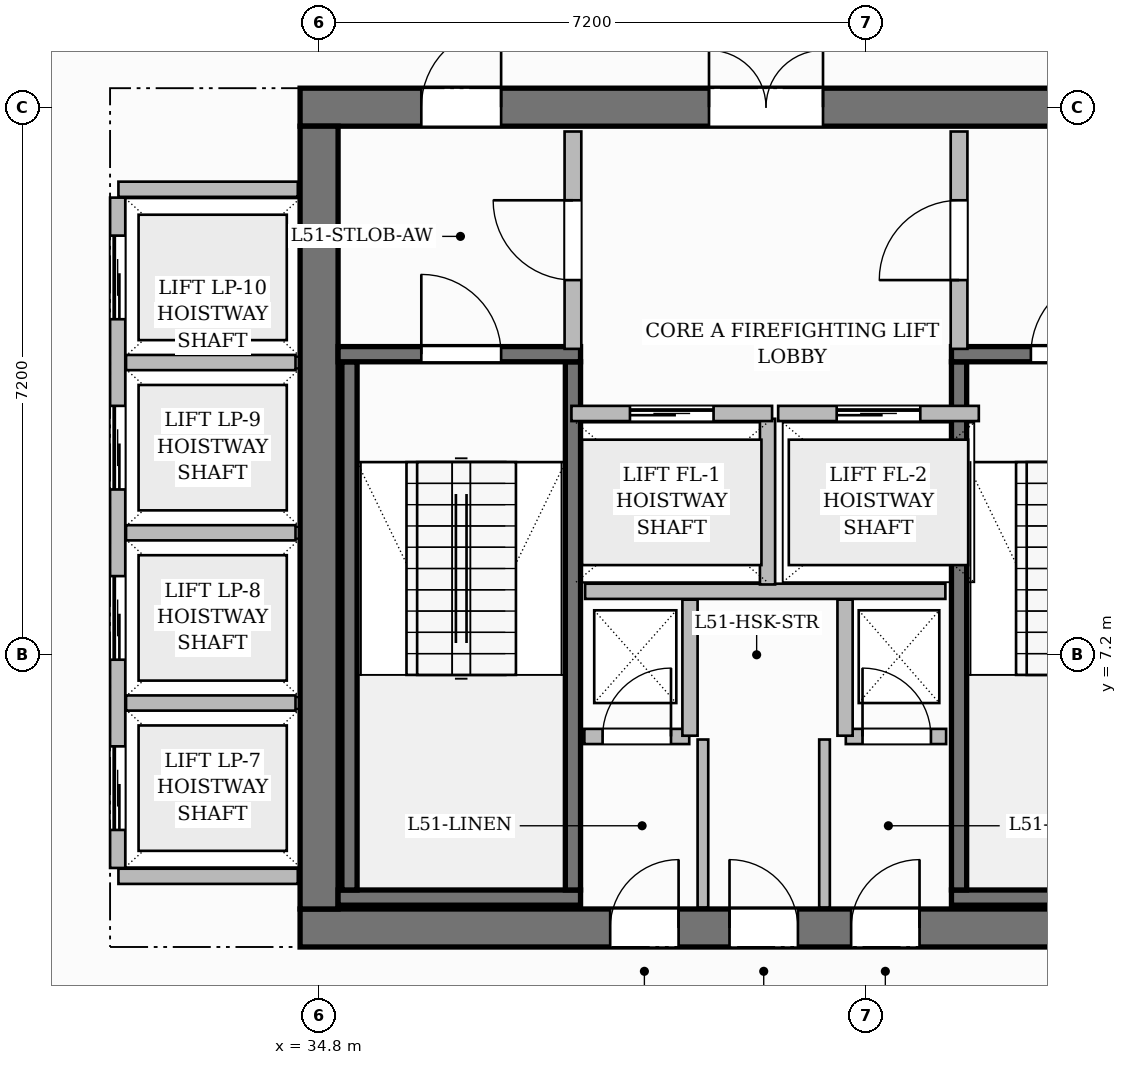
"""IFC4 building model, lengths in metres.
Left out: names, types, materials, properties, quantities, classifications, styles, units other than length and angle.
Written with IfcOpenShell. Run it as: python <this file> out.ifc"""

import sys

from ifc_helpers import new_model, si_unit, direction, frame, frame_2d, origin, place, context, subcontext, project, spatial, rectangle, extrude, source, transform, mapped, element, fill, save


model = new_model("IFC4")
c1 = context("Model", 3, precision=1e-05, world=origin(), true_north=direction((0.0, 1.0)))
c2 = subcontext(c1, "Body", "Model", "MODEL_VIEW")
j1 = project(units=[si_unit("LENGTHUNIT", "METRE"), si_unit("PLANEANGLEUNIT", "RADIAN")], contexts=[c1])
p1 = place(None, origin())
s1 = spatial("IfcSite", under=j1, at=p1, CompositionType="ELEMENT")
p2 = place(p1, origin())
s2 = spatial("IfcBuilding", under=s1, at=p2, CompositionType="ELEMENT")
p3 = place(p2, frame((0.0, 0.0, 205.75)))
s3 = spatial("IfcBuildingStorey", under=s2, at=p3, CompositionType="ELEMENT", Elevation=205.75)
p4 = place(p3, frame((34.55, 3.6, 0.0), z_axis=(0.0, 0.0, 1.0), x_axis=(1.0, 0.0, 0.0)))
e1 = element("IfcWall", 1, at=p4, inside=s3, PredefinedType="SHEAR", context=c2, shape_type="SweptSolid", body=[
    extrude(rectangle(XDim=15.5, YDim=0.5, at=frame_2d((7.75, 0.0))), origin(), (0.0, 0.0, 1.0), 3.85),
])
p5 = place(p4, frame((4.08, 0.0, 0.0)))
e2 = element("IfcOpeningElement", 2, at=p5, cuts=e1, PredefinedType="OPENING", context=c2, shape_type="SweptSolid", body=[
    extrude(rectangle(XDim=0.9, YDim=2.1, at=frame_2d((0.45, 1.05))), frame((0.0, 0.26, 0.0), z_axis=(0.0, -1.0, 0.0), x_axis=(1.0, 0.0, 0.0)), (0.0, 0.0, 1.0), 0.52),
])
p6 = place(p4, frame((5.65, 0.0, 0.0)))
e3 = element("IfcOpeningElement", 3, at=p6, cuts=e1, PredefinedType="OPENING", context=c2, shape_type="SweptSolid", body=[
    extrude(rectangle(XDim=0.9, YDim=2.1, at=frame_2d((0.45, 1.05))), frame((0.0, 0.26, 0.0), z_axis=(0.0, -1.0, 0.0), x_axis=(1.0, 0.0, 0.0)), (0.0, 0.0, 1.0), 0.52),
])
p7 = place(p4, frame((7.25, 0.0, 0.0)))
e4 = element("IfcOpeningElement", 4, at=p7, cuts=e1, PredefinedType="OPENING", context=c2, shape_type="SweptSolid", body=[
    extrude(rectangle(XDim=0.9, YDim=2.1, at=frame_2d((0.45, 1.05))), frame((0.0, 0.26, 0.0), z_axis=(0.0, -1.0, 0.0), x_axis=(1.0, 0.0, 0.0)), (0.0, 0.0, 1.0), 0.52),
])
p8 = place(p3, frame((34.55, 14.4, 0.0), z_axis=(0.0, 0.0, 1.0), x_axis=(1.0, 0.0, 0.0)))
e5 = element("IfcWall", 5, at=p8, inside=s3, PredefinedType="SHEAR", context=c2, shape_type="SweptSolid", body=[
    extrude(rectangle(XDim=15.5, YDim=0.5, at=frame_2d((7.75, 0.0))), origin(), (0.0, 0.0, 1.0), 3.85),
])
p9 = place(p8, frame((5.38, 0.0, 0.0)))
e6 = element("IfcOpeningElement", 6, at=p9, cuts=e5, PredefinedType="OPENING", context=c2, shape_type="SweptSolid", body=[
    extrude(rectangle(XDim=1.5, YDim=2.2, at=frame_2d((0.75, 1.1))), frame((0.0, 0.26, 0.0), z_axis=(0.0, -1.0, 0.0), x_axis=(1.0, 0.0, 0.0)), (0.0, 0.0, 1.0), 0.52),
])
p10 = place(p8, frame((1.595, 0.0, 0.0)))
e7 = element("IfcOpeningElement", 7, at=p10, cuts=e5, PredefinedType="OPENING", context=c2, shape_type="SweptSolid", body=[
    extrude(rectangle(XDim=1.05, YDim=2.15, at=frame_2d((0.525, 1.075))), frame((0.0, 0.26, 0.0), z_axis=(0.0, -1.0, 0.0), x_axis=(1.0, 0.0, 0.0)), (0.0, 0.0, 1.0), 0.52),
])
p11 = place(p8, frame((11.225, 0.0, 0.0)))
e8 = element("IfcOpeningElement", 8, at=p11, cuts=e5, PredefinedType="OPENING", context=c2, shape_type="SweptSolid", body=[
    extrude(rectangle(XDim=1.05, YDim=2.15, at=frame_2d((0.525, 1.075))), frame((0.0, 0.26, 0.0), z_axis=(0.0, -1.0, 0.0), x_axis=(1.0, 0.0, 0.0)), (0.0, 0.0, 1.0), 0.52),
])
p12 = place(p3, frame((34.8, 3.85, 0.0), z_axis=(0.0, 0.0, 1.0), x_axis=(0.0, 1.0, 0.0)))
e9 = element("IfcWall", 9, at=p12, inside=s3, PredefinedType="SHEAR", context=c2, shape_type="SweptSolid", body=[
    extrude(rectangle(XDim=10.3, YDim=0.5, at=frame_2d((5.15, 0.0))), origin(), (0.0, 0.0, 1.0), 3.85),
])
p13 = place(p3, frame((35.05, 4.0, 0.0), z_axis=(0.0, 0.0, 1.0), x_axis=(1.0, 0.0, 0.0)))
e10 = element("IfcWall", 10, at=p13, inside=s3, PredefinedType="SHEAR", context=c2, shape_type="SweptSolid", body=[
    extrude(rectangle(XDim=3.19, YDim=0.2, at=frame_2d((1.595, 0.0))), origin(), (0.0, 0.0, 1.0), 3.85),
])
for number, where, z_axis, x_axis in (
    (11, (35.2, 4.1, 0.0), (0.0, 0.0, 1.0), (0.0, 1.0, 0.0)),
    (12, (38.14, 4.1, 0.0), (0.0, 0.0, 1.0), (0.0, 1.0, 0.0)),
):
    element("IfcWall", number, at=place(p3, frame(where, z_axis=z_axis, x_axis=x_axis)), inside=s3, PredefinedType="SHEAR", context=c2, shape_type="SweptSolid", body=[
        extrude(rectangle(XDim=6.95, YDim=0.2, at=frame_2d((3.475, 0.0))), origin(), (0.0, 0.0, 1.0), 3.85),
    ])
p14 = place(p3, frame((35.05, 11.15, 0.0), z_axis=(0.0, 0.0, 1.0), x_axis=(1.0, 0.0, 0.0)))
e13 = element("IfcWall", 13, at=p14, inside=s3, PredefinedType="SHEAR", context=c2, shape_type="SweptSolid", body=[
    extrude(rectangle(XDim=3.19, YDim=0.2, at=frame_2d((1.595, 0.0))), origin(), (0.0, 0.0, 1.0), 3.85),
])
p15 = place(p14, frame((1.095, 0.0, 0.0)))
e14 = element("IfcOpeningElement", 14, at=p15, cuts=e13, PredefinedType="OPENING", context=c2, shape_type="SweptSolid", body=[
    extrude(rectangle(XDim=1.05, YDim=2.2, at=frame_2d((0.525, 1.1))), frame((0.0, 0.11, 0.0), z_axis=(0.0, -1.0, 0.0), x_axis=(1.0, 0.0, 0.0)), (0.0, 0.0, 1.0), 0.22),
])
p16 = place(p3, frame((43.12, 4.0, 0.0), z_axis=(0.0, 0.0, 1.0), x_axis=(1.0, 0.0, 0.0)))
e15 = element("IfcWall", 15, at=p16, inside=s3, PredefinedType="SHEAR", context=c2, shape_type="SweptSolid", body=[
    extrude(rectangle(XDim=6.43, YDim=0.2, at=frame_2d((3.215, 0.0))), origin(), (0.0, 0.0, 1.0), 3.85),
])
p17 = place(p3, frame((43.22, 4.1, 0.0), z_axis=(0.0, 0.0, 1.0), x_axis=(0.0, 1.0, 0.0)))
e16 = element("IfcWall", 16, at=p17, inside=s3, PredefinedType="SHEAR", context=c2, shape_type="SweptSolid", body=[
    extrude(rectangle(XDim=6.95, YDim=0.2, at=frame_2d((3.475, 0.0))), origin(), (0.0, 0.0, 1.0), 3.85),
])
p18 = place(p3, frame((43.12, 11.15, 0.0), z_axis=(0.0, 0.0, 1.0), x_axis=(1.0, 0.0, 0.0)))
e17 = element("IfcWall", 17, at=p18, inside=s3, PredefinedType="SHEAR", context=c2, shape_type="SweptSolid", body=[
    extrude(rectangle(XDim=6.43, YDim=0.2, at=frame_2d((3.215, 0.0))), origin(), (0.0, 0.0, 1.0), 3.85),
])
p19 = place(p18, frame((1.045, 0.0, 0.0)))
e18 = element("IfcOpeningElement", 18, at=p19, cuts=e17, PredefinedType="OPENING", context=c2, shape_type="SweptSolid", body=[
    extrude(rectangle(XDim=1.05, YDim=2.2, at=frame_2d((0.525, 1.1))), frame((0.0, 0.11, 0.0), z_axis=(0.0, -1.0, 0.0), x_axis=(1.0, 0.0, 0.0)), (0.0, 0.0, 1.0), 0.22),
])
p20 = place(p18, frame((4.125, 0.0, 0.0)))
e19 = element("IfcOpeningElement", 19, at=p20, cuts=e17, PredefinedType="OPENING", context=c2, shape_type="SweptSolid", body=[
    extrude(rectangle(XDim=1.05, YDim=2.2, at=frame_2d((0.525, 1.1))), frame((0.0, 0.11, 0.0), z_axis=(0.0, -1.0, 0.0), x_axis=(1.0, 0.0, 0.0)), (0.0, 0.0, 1.0), 0.22),
])
p21 = place(p3, frame((38.3, 8.03, 0.0), z_axis=(0.0, 0.0, 1.0), x_axis=(1.0, 0.0, 0.0)))
e20 = element("IfcWall", 20, at=p21, inside=s3, PredefinedType="PARTITIONING", context=c2, shape_type="SweptSolid", body=[
    extrude(rectangle(XDim=4.74, YDim=0.2, at=frame_2d((2.37, 0.0))), origin(), (0.0, 0.0, 1.0), 3.6),
])
p22 = place(p3, frame((40.7, 8.12, 0.0), z_axis=(0.0, 0.0, 1.0), x_axis=(0.0, 1.0, 0.0)))
e21 = element("IfcWall", 21, at=p22, inside=s3, PredefinedType="PARTITIONING", context=c2, shape_type="SweptSolid", body=[
    extrude(rectangle(XDim=2.18, YDim=0.2, at=frame_2d((1.09, 0.0))), origin(), (0.0, 0.0, 1.0), 3.6),
])
p23 = place(p3, frame((38.14, 11.22, 0.0), z_axis=(0.0, 0.0, 1.0), x_axis=(0.0, 1.0, 0.0)))
e22 = element("IfcWall", 22, at=p23, inside=s3, PredefinedType="PARTITIONING", context=c2, shape_type="SweptSolid", body=[
    extrude(rectangle(XDim=2.86, YDim=0.22, at=frame_2d((1.43, 0.0))), origin(), (0.0, 0.0, 1.0), 3.6),
])
p24 = place(p23, frame((0.905, 0.0, 0.0)))
e23 = element("IfcOpeningElement", 23, at=p24, cuts=e22, PredefinedType="OPENING", context=c2, shape_type="SweptSolid", body=[
    extrude(rectangle(XDim=1.05, YDim=2.15, at=frame_2d((0.525, 1.075))), frame((0.0, 0.12, 0.0), z_axis=(0.0, -1.0, 0.0), x_axis=(1.0, 0.0, 0.0)), (0.0, 0.0, 1.0), 0.24),
])
p25 = place(p3, frame((43.22, 11.22, 0.0), z_axis=(0.0, 0.0, 1.0), x_axis=(0.0, 1.0, 0.0)))
e24 = element("IfcWall", 24, at=p25, inside=s3, PredefinedType="PARTITIONING", context=c2, shape_type="SweptSolid", body=[
    extrude(rectangle(XDim=2.86, YDim=0.22, at=frame_2d((1.43, 0.0))), origin(), (0.0, 0.0, 1.0), 3.6),
])
p26 = place(p25, frame((0.905, 0.0, 0.0)))
e25 = element("IfcOpeningElement", 25, at=p26, cuts=e24, PredefinedType="OPENING", context=c2, shape_type="SweptSolid", body=[
    extrude(rectangle(XDim=1.05, YDim=2.15, at=frame_2d((0.525, 1.075))), frame((0.0, 0.12, 0.0), z_axis=(0.0, -1.0, 0.0), x_axis=(1.0, 0.0, 0.0)), (0.0, 0.0, 1.0), 0.24),
])
p27 = place(p3, frame((38.29, 6.12, 0.0), z_axis=(0.0, 0.0, 1.0), x_axis=(1.0, 0.0, 0.0)))
e26 = element("IfcWall", 26, at=p27, inside=s3, PredefinedType="PARTITIONING", context=c2, shape_type="SweptSolid", body=[
    extrude(rectangle(XDim=1.38, YDim=0.2, at=frame_2d((0.69, 0.0))), origin(), (0.0, 0.0, 1.0), 3.6),
])
p28 = place(p27, frame((0.24, 0.0, 0.0)))
e27 = element("IfcOpeningElement", 27, at=p28, cuts=e26, PredefinedType="OPENING", context=c2, shape_type="SweptSolid", body=[
    extrude(rectangle(XDim=0.9, YDim=2.1, at=frame_2d((0.45, 1.05))), frame((0.0, 0.11, 0.0), z_axis=(0.0, -1.0, 0.0), x_axis=(1.0, 0.0, 0.0)), (0.0, 0.0, 1.0), 0.22),
])
p29 = place(p3, frame((39.68, 6.13, 0.0), z_axis=(0.0, 0.0, 1.0), x_axis=(0.0, 1.0, 0.0)))
e28 = element("IfcWall", 28, at=p29, inside=s3, PredefinedType="PARTITIONING", context=c2, shape_type="SweptSolid", body=[
    extrude(rectangle(XDim=1.79, YDim=0.2, at=frame_2d((0.895, 0.0))), origin(), (0.0, 0.0, 1.0), 3.6),
])
p30 = place(p3, frame((41.73, 6.12, 0.0), z_axis=(0.0, 0.0, 1.0), x_axis=(1.0, 0.0, 0.0)))
e29 = element("IfcWall", 29, at=p30, inside=s3, PredefinedType="PARTITIONING", context=c2, shape_type="SweptSolid", body=[
    extrude(rectangle(XDim=1.32, YDim=0.2, at=frame_2d((0.66, 0.0))), origin(), (0.0, 0.0, 1.0), 3.6),
])
p31 = place(p30, frame((0.22, 0.0, 0.0)))
e30 = element("IfcOpeningElement", 30, at=p31, cuts=e29, PredefinedType="OPENING", context=c2, shape_type="SweptSolid", body=[
    extrude(rectangle(XDim=0.9, YDim=2.1, at=frame_2d((0.45, 1.05))), frame((0.0, 0.11, 0.0), z_axis=(0.0, -1.0, 0.0), x_axis=(1.0, 0.0, 0.0)), (0.0, 0.0, 1.0), 0.22),
])
p32 = place(p3, frame((41.72, 6.13, 0.0), z_axis=(0.0, 0.0, 1.0), x_axis=(0.0, 1.0, 0.0)))
e31 = element("IfcWall", 31, at=p32, inside=s3, PredefinedType="PARTITIONING", context=c2, shape_type="SweptSolid", body=[
    extrude(rectangle(XDim=1.79, YDim=0.2, at=frame_2d((0.895, 0.0))), origin(), (0.0, 0.0, 1.0), 3.6),
])
for number, where, z_axis, x_axis in (
    (32, (39.85, 3.87, 0.0), (0.0, 0.0, 1.0), (0.0, 1.0, 0.0)),
    (33, (41.45, 3.87, 0.0), (0.0, 0.0, 1.0), (0.0, 1.0, 0.0)),
):
    element("IfcWall", number, at=place(p3, frame(where, z_axis=z_axis, x_axis=x_axis)), inside=s3, PredefinedType="PARTITIONING", context=c2, shape_type="SweptSolid", body=[
        extrude(rectangle(XDim=2.21, YDim=0.14, at=frame_2d((1.105, 0.0))), origin(), (0.0, 0.0, 1.0), 3.6),
    ])
for number, where, z_axis, x_axis in (
    (34, (32.16, 4.28, 0.0), (0.0, 0.0, 1.0), (1.0, 0.0, 0.0)),
    (35, (32.16, 13.32, 0.0), (0.0, 0.0, 1.0), (1.0, 0.0, 0.0)),
):
    element("IfcWall", number, at=place(p3, frame(where, z_axis=z_axis, x_axis=x_axis)), inside=s3, PredefinedType="PARTITIONING", context=c2, shape_type="SweptSolid", body=[
        extrude(rectangle(XDim=2.36, YDim=0.2, at=frame_2d((1.18, 0.0))), origin(), (0.0, 0.0, 1.0), 3.6),
    ])
p33 = place(p3, frame((32.15, 4.39, 0.0), z_axis=(0.0, 0.0, 1.0), x_axis=(0.0, 1.0, 0.0)))
e36 = element("IfcWall", 36, at=p33, inside=s3, PredefinedType="PARTITIONING", context=c2, shape_type="SweptSolid", body=[
    extrude(rectangle(XDim=8.82, YDim=0.2, at=frame_2d((4.41, 0.0))), origin(), (0.0, 0.0, 1.0), 3.6),
])
p34 = place(p33, frame((0.5, 0.0, 0.0)))
e37 = element("IfcOpeningElement", 37, at=p34, cuts=e36, PredefinedType="OPENING", context=c2, shape_type="SweptSolid", body=[
    extrude(rectangle(XDim=1.1, YDim=2.2, at=frame_2d((0.55, 1.1))), frame((0.0, 0.11, 0.0), z_axis=(0.0, -1.0, 0.0), x_axis=(1.0, 0.0, 0.0)), (0.0, 0.0, 1.0), 0.22),
])
p35 = place(p33, frame((2.74, 0.0, 0.0)))
e38 = element("IfcOpeningElement", 38, at=p35, cuts=e36, PredefinedType="OPENING", context=c2, shape_type="SweptSolid", body=[
    extrude(rectangle(XDim=1.1, YDim=2.2, at=frame_2d((0.55, 1.1))), frame((0.0, 0.11, 0.0), z_axis=(0.0, -1.0, 0.0), x_axis=(1.0, 0.0, 0.0)), (0.0, 0.0, 1.0), 0.22),
])
p36 = place(p33, frame((4.98, 0.0, 0.0)))
e39 = element("IfcOpeningElement", 39, at=p36, cuts=e36, PredefinedType="OPENING", context=c2, shape_type="SweptSolid", body=[
    extrude(rectangle(XDim=1.1, YDim=2.2, at=frame_2d((0.55, 1.1))), frame((0.0, 0.11, 0.0), z_axis=(0.0, -1.0, 0.0), x_axis=(1.0, 0.0, 0.0)), (0.0, 0.0, 1.0), 0.22),
])
p37 = place(p33, frame((7.22, 0.0, 0.0)))
e40 = element("IfcOpeningElement", 40, at=p37, cuts=e36, PredefinedType="OPENING", context=c2, shape_type="SweptSolid", body=[
    extrude(rectangle(XDim=1.1, YDim=2.2, at=frame_2d((0.55, 1.1))), frame((0.0, 0.11, 0.0), z_axis=(0.0, -1.0, 0.0), x_axis=(1.0, 0.0, 0.0)), (0.0, 0.0, 1.0), 0.22),
])
for number, where, z_axis, x_axis in (
    (41, (32.26, 6.56, 0.0), (0.0, 0.0, 1.0), (1.0, 0.0, 0.0)),
    (42, (32.26, 8.8, 0.0), (0.0, 0.0, 1.0), (1.0, 0.0, 0.0)),
    (43, (32.26, 11.04, 0.0), (0.0, 0.0, 1.0), (1.0, 0.0, 0.0)),
):
    element("IfcWall", number, at=place(p3, frame(where, z_axis=z_axis, x_axis=x_axis)), inside=s3, PredefinedType="PARTITIONING", context=c2, shape_type="SweptSolid", body=[
        extrude(rectangle(XDim=2.23, YDim=0.2, at=frame_2d((1.115, 0.0))), origin(), (0.0, 0.0, 1.0), 3.6),
    ])
p38 = place(p3, frame((38.12, 10.37, 0.0), z_axis=(0.0, 0.0, 1.0), x_axis=(1.0, 0.0, 0.0)))
e44 = element("IfcWall", 44, at=p38, inside=s3, PredefinedType="PARTITIONING", context=c2, shape_type="SweptSolid", body=[
    extrude(rectangle(XDim=2.64, YDim=0.2, at=frame_2d((1.32, 0.0))), origin(), (0.0, 0.0, 1.0), 3.6),
])
p39 = place(p38, frame((0.77, 0.0, 0.0)))
e45 = element("IfcOpeningElement", 45, at=p39, cuts=e44, PredefinedType="OPENING", context=c2, shape_type="SweptSolid", body=[
    extrude(rectangle(XDim=1.1, YDim=2.2, at=frame_2d((0.55, 1.1))), frame((0.0, 0.11, 0.0), z_axis=(0.0, -1.0, 0.0), x_axis=(1.0, 0.0, 0.0)), (0.0, 0.0, 1.0), 0.22),
])
p40 = place(p3, frame((40.84, 10.37, 0.0), z_axis=(0.0, 0.0, 1.0), x_axis=(1.0, 0.0, 0.0)))
e46 = element("IfcWall", 46, at=p40, inside=s3, PredefinedType="PARTITIONING", context=c2, shape_type="SweptSolid", body=[
    extrude(rectangle(XDim=2.64, YDim=0.2, at=frame_2d((1.32, 0.0))), origin(), (0.0, 0.0, 1.0), 3.6),
])
p41 = place(p40, frame((0.77, 0.0, 0.0)))
e47 = element("IfcOpeningElement", 47, at=p41, cuts=e46, PredefinedType="OPENING", context=c2, shape_type="SweptSolid", body=[
    extrude(rectangle(XDim=1.1, YDim=2.2, at=frame_2d((0.55, 1.1))), frame((0.0, 0.11, 0.0), z_axis=(0.0, -1.0, 0.0), x_axis=(1.0, 0.0, 0.0)), (0.0, 0.0, 1.0), 0.22),
])
m1 = source(origin(), c2, "Body", "SweptSolid", [
    extrude(rectangle(XDim=1.05, YDim=2.2, at=frame_2d((0.525, 1.1))), frame((0.0, 0.025, 0.0), z_axis=(0.0, -1.0, 0.0), x_axis=(1.0, 0.0, 0.0)), (0.0, 0.0, 1.0), 0.05),
])
p42 = place(p15, origin())
e48 = element("IfcDoor", 48, at=p42, inside=s3, OperationType="SINGLE_SWING_LEFT", PredefinedType="DOOR", context=c2, shape_type="MappedRepresentation", body=[
    mapped(m1, transform((0.0, 0.0, 0.0), scale=1.0)),
])
fill(e14, e48)
p43 = place(p19, origin())
e49 = element("IfcDoor", 49, at=p43, inside=s3, OperationType="SINGLE_SWING_RIGHT", PredefinedType="DOOR", context=c2, shape_type="MappedRepresentation", body=[
    mapped(m1, transform((0.0, 0.0, 0.0), scale=1.0)),
])
fill(e18, e49)
m2 = source(origin(), c2, "Body", "SweptSolid", [
    extrude(rectangle(XDim=1.05, YDim=2.15, at=frame_2d((0.525, 1.075))), frame((0.0, 0.025, 0.0), z_axis=(0.0, -1.0, 0.0), x_axis=(1.0, 0.0, 0.0)), (0.0, 0.0, 1.0), 0.05),
])
p44 = place(p24, origin())
e50 = element("IfcDoor", 50, at=p44, inside=s3, OperationType="SINGLE_SWING_RIGHT", PredefinedType="DOOR", context=c2, shape_type="MappedRepresentation", body=[
    mapped(m2, transform((0.0, 0.0, 0.0), scale=1.0)),
])
fill(e23, e50)
p45 = place(p26, origin())
e51 = element("IfcDoor", 51, at=p45, inside=s3, OperationType="SINGLE_SWING_LEFT", PredefinedType="DOOR", context=c2, shape_type="MappedRepresentation", body=[
    mapped(m2, transform((0.0, 0.0, 0.0), scale=1.0)),
])
fill(e25, e51)
m3 = source(origin(), c2, "Body", "SweptSolid", [
    extrude(rectangle(XDim=1.5, YDim=2.2, at=frame_2d((0.75, 1.1))), frame((0.0, 0.025, 0.0), z_axis=(0.0, -1.0, 0.0), x_axis=(1.0, 0.0, 0.0)), (0.0, 0.0, 1.0), 0.05),
])
p46 = place(p9, origin())
e52 = element("IfcDoor", 52, at=p46, inside=s3, OperationType="DOUBLE_DOOR_SINGLE_SWING", PredefinedType="DOOR", context=c2, shape_type="MappedRepresentation", body=[
    mapped(m3, transform((0.0, 0.0, 0.0), scale=1.0)),
])
fill(e6, e52)
p47 = place(p10, origin())
e53 = element("IfcDoor", 53, at=p47, inside=s3, OperationType="SINGLE_SWING_RIGHT", PredefinedType="DOOR", context=c2, shape_type="MappedRepresentation", body=[
    mapped(m2, transform((0.0, 0.0, 0.0), scale=1.0)),
])
fill(e7, e53)
m4 = source(origin(), c2, "Body", "SweptSolid", [
    extrude(rectangle(XDim=0.9, YDim=2.1, at=frame_2d((0.45, 1.05))), frame((0.0, 0.025, 0.0), z_axis=(0.0, -1.0, 0.0), x_axis=(1.0, 0.0, 0.0)), (0.0, 0.0, 1.0), 0.05),
])
p48 = place(p28, origin())
e54 = element("IfcDoor", 54, at=p48, inside=s3, OperationType="SINGLE_SWING_RIGHT", PredefinedType="DOOR", context=c2, shape_type="MappedRepresentation", body=[
    mapped(m4, transform((0.0, 0.0, 0.0), scale=1.0)),
])
fill(e27, e54)
p49 = place(p31, origin())
e55 = element("IfcDoor", 55, at=p49, inside=s3, OperationType="SINGLE_SWING_LEFT", PredefinedType="DOOR", context=c2, shape_type="MappedRepresentation", body=[
    mapped(m4, transform((0.0, 0.0, 0.0), scale=1.0)),
])
fill(e30, e55)
p50 = place(p5, origin())
e56 = element("IfcDoor", 56, at=p50, inside=s3, OperationType="SINGLE_SWING_RIGHT", PredefinedType="DOOR", context=c2, shape_type="MappedRepresentation", body=[
    mapped(m4, transform((0.0, 0.0, 0.0), scale=1.0)),
])
fill(e2, e56)
p51 = place(p6, origin())
e57 = element("IfcDoor", 57, at=p51, inside=s3, OperationType="SINGLE_SWING_LEFT", PredefinedType="DOOR", context=c2, shape_type="MappedRepresentation", body=[
    mapped(m4, transform((0.0, 0.0, 0.0), scale=1.0)),
])
fill(e3, e57)
p52 = place(p7, origin())
e58 = element("IfcDoor", 58, at=p52, inside=s3, OperationType="SINGLE_SWING_RIGHT", PredefinedType="DOOR", context=c2, shape_type="MappedRepresentation", body=[
    mapped(m4, transform((0.0, 0.0, 0.0), scale=1.0)),
])
fill(e4, e58)
m5 = source(origin(), c2, "Body", "SweptSolid", [
    extrude(rectangle(XDim=1.1, YDim=2.2, at=frame_2d((0.55, 1.1))), frame((0.0, 0.025, 0.0), z_axis=(0.0, -1.0, 0.0), x_axis=(1.0, 0.0, 0.0)), (0.0, 0.0, 1.0), 0.05),
])
p53 = place(p39, origin())
e59 = element("IfcDoor", 59, at=p53, inside=s3, OperationType="SLIDING_TO_LEFT", PredefinedType="DOOR", context=c2, shape_type="MappedRepresentation", body=[
    mapped(m5, transform((0.0, 0.0, 0.0), scale=1.0)),
])
fill(e45, e59)
p54 = place(p41, origin())
e60 = element("IfcDoor", 60, at=p54, inside=s3, OperationType="SLIDING_TO_LEFT", PredefinedType="DOOR", context=c2, shape_type="MappedRepresentation", body=[
    mapped(m5, transform((0.0, 0.0, 0.0), scale=1.0)),
])
fill(e47, e60)
p55 = place(p34, origin())
e61 = element("IfcDoor", 61, at=p55, inside=s3, OperationType="SLIDING_TO_LEFT", PredefinedType="DOOR", context=c2, shape_type="MappedRepresentation", body=[
    mapped(m5, transform((0.0, 0.0, 0.0), scale=1.0)),
])
fill(e37, e61)
p56 = place(p35, origin())
e62 = element("IfcDoor", 62, at=p56, inside=s3, OperationType="SLIDING_TO_LEFT", PredefinedType="DOOR", context=c2, shape_type="MappedRepresentation", body=[
    mapped(m5, transform((0.0, 0.0, 0.0), scale=1.0)),
])
fill(e38, e62)
p57 = place(p36, origin())
e63 = element("IfcDoor", 63, at=p57, inside=s3, OperationType="SLIDING_TO_LEFT", PredefinedType="DOOR", context=c2, shape_type="MappedRepresentation", body=[
    mapped(m5, transform((0.0, 0.0, 0.0), scale=1.0)),
])
fill(e39, e63)
p58 = place(p37, origin())
e64 = element("IfcDoor", 64, at=p58, inside=s3, OperationType="SLIDING_TO_LEFT", PredefinedType="DOOR", context=c2, shape_type="MappedRepresentation", body=[
    mapped(m5, transform((0.0, 0.0, 0.0), scale=1.0)),
])
fill(e40, e64)
save(model, sys.argv[1])
